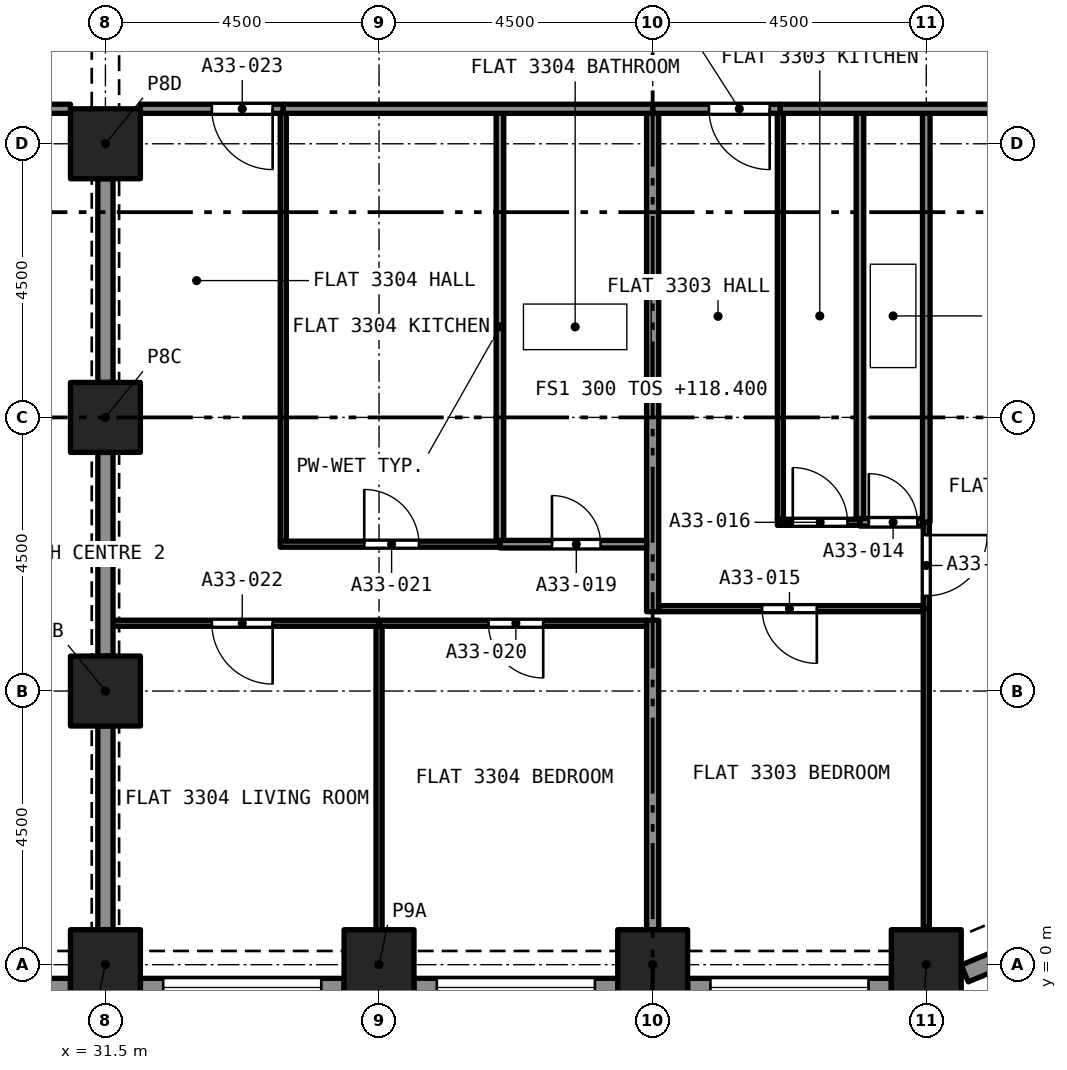
"""IFC4 building model, lengths in metres.
Left out: names, types, materials, properties, quantities, classifications, styles, units other than length and angle.
Written with IfcOpenShell. Run it as: python <this file> out.ifc"""

import sys

from ifc_helpers import new_model, si_unit, direction, frame, frame_2d, origin, origin_2d, place, context, subcontext, project, spatial, rectangle, extrude, element, fill, save


model = new_model("IFC4")
c1 = context("Model", 3, precision=1e-05, world=origin(), true_north=direction((0.0, 1.0)))
c2 = subcontext(c1, "Body", "Model", "MODEL_VIEW")
j1 = project(units=[si_unit("LENGTHUNIT", "METRE"), si_unit("PLANEANGLEUNIT", "RADIAN")], contexts=[c1])
p1 = place(None, origin())
s1 = spatial("IfcSite", under=j1, at=p1, CompositionType="ELEMENT")
p2 = place(p1, origin())
s2 = spatial("IfcBuilding", under=s1, at=p2, CompositionType="ELEMENT")
p3 = place(p2, frame((0.0, 0.0, 118.4)))
s3 = spatial("IfcBuildingStorey", under=s2, at=p3, CompositionType="ELEMENT", Elevation=118.4)
for number, where, z_axis, x_axis in (
    (1, (31.5, 0.0, 0.0), (0.0, 0.0, 1.0), (1.0, 0.0, 0.0)),
    (2, (36.0, 0.0, 0.0), (0.0, 0.0, 1.0), (1.0, 0.0, 0.0)),
    (3, (40.5, 0.0, 0.0), (0.0, 0.0, 1.0), (1.0, 0.0, 0.0)),
    (4, (45.0, 0.0, 0.0), (0.0, 0.0, 1.0), (1.0, 0.0, 0.0)),
    (5, (31.5, 4.5, 0.0), (0.0, 0.0, 1.0), (1.0, 0.0, 0.0)),
    (6, (31.5, 9.0, 0.0), (0.0, 0.0, 1.0), (1.0, 0.0, 0.0)),
    (7, (31.5, 13.5, 0.0), (0.0, 0.0, 1.0), (1.0, 0.0, 0.0)),
):
    element("IfcColumn", number, at=place(p3, frame(where, z_axis=z_axis, x_axis=x_axis)), inside=s3, PredefinedType="COLUMN", context=c2, shape_type="SweptSolid", body=[
        extrude(rectangle(XDim=1.15, YDim=1.15, at=origin_2d()), origin(), (0.0, 0.0, 1.0), 3.2),
    ])
p4 = place(p3, frame((30.925, -0.375, 0.0), z_axis=(0.0, 0.0, 1.0), x_axis=(-1.0, 0.0, 0.0)))
e8 = element("IfcWall", 8, at=p4, inside=s3, PredefinedType="SOLIDWALL", context=c2, shape_type="SweptSolid", body=[
    extrude(rectangle(XDim=3.35, YDim=0.3, at=frame_2d((1.675, 0.0))), origin(), (0.0, 0.0, 1.0), 3.2),
])
p5 = place(p4, frame((0.375, 0.0, 0.45)))
e9 = element("IfcOpeningElement", 9, at=p5, cuts=e8, PredefinedType="OPENING", context=c2, shape_type="SweptSolid", body=[
    extrude(rectangle(XDim=2.6, YDim=1.95, at=frame_2d((1.3, 0.975))), frame((0.0, 0.16, 0.0), z_axis=(0.0, -1.0, 0.0), x_axis=(1.0, 0.0, 0.0)), (0.0, 0.0, 1.0), 0.32),
])
p6 = place(p3, frame((35.425, -0.375, 0.0), z_axis=(0.0, 0.0, 1.0), x_axis=(-1.0, 0.0, 0.0)))
e10 = element("IfcWall", 10, at=p6, inside=s3, PredefinedType="SOLIDWALL", context=c2, shape_type="SweptSolid", body=[
    extrude(rectangle(XDim=3.35, YDim=0.3, at=frame_2d((1.675, 0.0))), origin(), (0.0, 0.0, 1.0), 3.2),
])
p7 = place(p6, frame((0.375, 0.0, 0.45)))
e11 = element("IfcOpeningElement", 11, at=p7, cuts=e10, PredefinedType="OPENING", context=c2, shape_type="SweptSolid", body=[
    extrude(rectangle(XDim=2.6, YDim=1.95, at=frame_2d((1.3, 0.975))), frame((0.0, 0.16, 0.0), z_axis=(0.0, -1.0, 0.0), x_axis=(1.0, 0.0, 0.0)), (0.0, 0.0, 1.0), 0.32),
])
p8 = place(p3, frame((39.925, -0.375, 0.0), z_axis=(0.0, 0.0, 1.0), x_axis=(-1.0, 0.0, 0.0)))
e12 = element("IfcWall", 12, at=p8, inside=s3, PredefinedType="SOLIDWALL", context=c2, shape_type="SweptSolid", body=[
    extrude(rectangle(XDim=3.35, YDim=0.3, at=frame_2d((1.675, 0.0))), origin(), (0.0, 0.0, 1.0), 3.2),
])
p9 = place(p8, frame((0.375, 0.0, 0.45)))
e13 = element("IfcOpeningElement", 13, at=p9, cuts=e12, PredefinedType="OPENING", context=c2, shape_type="SweptSolid", body=[
    extrude(rectangle(XDim=2.6, YDim=1.95, at=frame_2d((1.3, 0.975))), frame((0.0, 0.16, 0.0), z_axis=(0.0, -1.0, 0.0), x_axis=(1.0, 0.0, 0.0)), (0.0, 0.0, 1.0), 0.32),
])
p10 = place(p3, frame((44.425, -0.375, 0.0), z_axis=(0.0, 0.0, 1.0), x_axis=(-1.0, 0.0, 0.0)))
e14 = element("IfcWall", 14, at=p10, inside=s3, PredefinedType="SOLIDWALL", context=c2, shape_type="SweptSolid", body=[
    extrude(rectangle(XDim=3.35, YDim=0.3, at=frame_2d((1.675, 0.0))), origin(), (0.0, 0.0, 1.0), 3.2),
])
p11 = place(p10, frame((0.375, 0.0, 0.45)))
e15 = element("IfcOpeningElement", 15, at=p11, cuts=e14, PredefinedType="OPENING", context=c2, shape_type="SweptSolid", body=[
    extrude(rectangle(XDim=2.6, YDim=1.95, at=frame_2d((1.3, 0.975))), frame((0.0, 0.16, 0.0), z_axis=(0.0, -1.0, 0.0), x_axis=(1.0, 0.0, 0.0)), (0.0, 0.0, 1.0), 0.32),
])
p12 = place(p3, frame((47.631, 0.684, 0.0), z_axis=(0.0, 0.0, 1.0), x_axis=(-0.923862802911, -0.382723818695, 0.0)))
e16 = element("IfcWall", 16, at=p12, inside=s3, PredefinedType="SOLIDWALL", context=c2, shape_type="SweptSolid", body=[
    extrude(rectangle(XDim=2.164, YDim=0.3, at=frame_2d((1.082, 0.0))), origin(), (0.0, 0.0, 1.0), 3.2),
])
p13 = place(p12, frame((0.271, 0.0, 0.45)))
e17 = element("IfcOpeningElement", 17, at=p13, cuts=e16, PredefinedType="OPENING", context=c2, shape_type="SweptSolid", body=[
    extrude(rectangle(XDim=1.4, YDim=1.95, at=frame_2d((0.7, 0.975))), frame((0.0, 0.16, 0.0), z_axis=(0.0, -1.0, 0.0), x_axis=(1.0, 0.0, 0.0)), (0.0, 0.0, 1.0), 0.32),
])
p14 = place(p3, frame((43.909, 7.275, 0.0), z_axis=(0.0, 0.0, 1.0), x_axis=(1.0, 0.0, 0.0)))
e18 = element("IfcWall", 18, at=p14, inside=s3, PredefinedType="PARTITIONING", context=c2, shape_type="SweptSolid", body=[
    extrude(rectangle(XDim=1.028, YDim=0.125, at=frame_2d((0.514, 0.0))), origin(), (0.0, 0.0, 1.0), 2.9),
])
p15 = place(p14, frame((0.146, 0.0, 0.0)))
e19 = element("IfcOpeningElement", 19, at=p15, cuts=e18, PredefinedType="OPENING", context=c2, shape_type="SweptSolid", body=[
    extrude(rectangle(XDim=0.8, YDim=2.1, at=frame_2d((0.4, 1.05))), frame((0.0, 0.073, 0.0), z_axis=(0.0, -1.0, 0.0), x_axis=(1.0, 0.0, 0.0)), (0.0, 0.0, 1.0), 0.145),
])
p16 = place(p3, frame((43.909, 7.337, 0.0), z_axis=(0.0, 0.0, 1.0), x_axis=(0.0, 1.0, 0.0)))
e20 = element("IfcWall", 20, at=p16, inside=s3, PredefinedType="PARTITIONING", context=c2, shape_type="SweptSolid", body=[
    extrude(rectangle(XDim=6.663, YDim=0.125, at=frame_2d((3.331, 0.0))), origin(), (0.0, 0.0, 1.0), 2.9),
])
p17 = place(p3, frame((45.0, 7.275, 0.0), z_axis=(0.0, 0.0, 1.0), x_axis=(0.0, 1.0, 0.0)))
e21 = element("IfcWall", 21, at=p17, inside=s3, PredefinedType="PARTITIONING", context=c2, shape_type="SweptSolid", body=[
    extrude(rectangle(XDim=6.725, YDim=0.125, at=frame_2d((3.363, 0.0))), origin(), (0.0, 0.0, 1.0), 2.9),
])
p18 = place(p3, frame((44.95, 5.855, 0.0), z_axis=(0.0, 0.0, 1.0), x_axis=(-1.0, 0.0, 0.0)))
e22 = element("IfcWall", 22, at=p18, inside=s3, PredefinedType="PARTITIONING", context=c2, shape_type="SweptSolid", body=[
    extrude(rectangle(XDim=4.35, YDim=0.1, at=frame_2d((2.175, 0.0))), origin(), (0.0, 0.0, 1.0), 2.9),
])
p19 = place(p18, frame((1.75, 0.0, 0.0)))
e23 = element("IfcOpeningElement", 23, at=p19, cuts=e22, PredefinedType="OPENING", context=c2, shape_type="SweptSolid", body=[
    extrude(rectangle(XDim=0.9, YDim=2.1, at=frame_2d((0.45, 1.05))), frame((0.0, 0.06, 0.0), z_axis=(0.0, -1.0, 0.0), x_axis=(1.0, 0.0, 0.0)), (0.0, 0.0, 1.0), 0.12),
])
p20 = place(p3, frame((45.0, 0.622, 0.0), z_axis=(0.0, 0.0, 1.0), x_axis=(0.0, 1.0, 0.0)))
e24 = element("IfcWall", 24, at=p20, inside=s3, PredefinedType="PARTITIONING", context=c2, shape_type="SweptSolid", body=[
    extrude(rectangle(XDim=5.233, YDim=0.1, at=frame_2d((2.616, 0.0))), origin(), (0.0, 0.0, 1.0), 2.9),
])
p21 = place(p3, frame((40.5, 0.575, 0.0), z_axis=(0.0, 0.0, 1.0), x_axis=(0.0, 1.0, 0.0)))
e25 = element("IfcWall", 25, at=p21, inside=s3, PredefinedType="PARTITIONING", context=c2, shape_type="SweptSolid", body=[
    extrude(rectangle(XDim=5.09, YDim=0.2, at=frame_2d((2.545, 0.0))), origin(), (0.0, 0.0, 1.0), 2.9),
])
p22 = place(p3, frame((42.6, 7.325, 0.0), z_axis=(0.0, 0.0, 1.0), x_axis=(0.0, 1.0, 0.0)))
e26 = element("IfcWall", 26, at=p22, inside=s3, PredefinedType="PARTITIONING", context=c2, shape_type="SweptSolid", body=[
    extrude(rectangle(XDim=6.675, YDim=0.1, at=frame_2d((3.337, 0.0))), origin(), (0.0, 0.0, 1.0), 2.9),
])
p23 = place(p3, frame((42.55, 7.275, 0.0), z_axis=(0.0, 0.0, 1.0), x_axis=(1.0, 0.0, 0.0)))
e27 = element("IfcWall", 27, at=p23, inside=s3, PredefinedType="PARTITIONING", context=c2, shape_type="SweptSolid", body=[
    extrude(rectangle(XDim=1.359, YDim=0.1, at=frame_2d((0.68, 0.0))), origin(), (0.0, 0.0, 1.0), 2.9),
])
p24 = place(p23, frame((0.254, 0.0, 0.0)))
e28 = element("IfcOpeningElement", 28, at=p24, cuts=e27, PredefinedType="OPENING", context=c2, shape_type="SweptSolid", body=[
    extrude(rectangle(XDim=0.9, YDim=2.1, at=frame_2d((0.45, 1.05))), frame((0.0, 0.06, 0.0), z_axis=(0.0, -1.0, 0.0), x_axis=(1.0, 0.0, 0.0)), (0.0, 0.0, 1.0), 0.12),
])
p25 = place(p3, frame((45.0, 7.275, 0.0), z_axis=(0.0, 0.0, 1.0), x_axis=(0.0, -1.0, 0.0)))
e29 = element("IfcWall", 29, at=p25, inside=s3, PredefinedType="PARTITIONING", context=c2, shape_type="SweptSolid", body=[
    extrude(rectangle(XDim=1.42, YDim=0.1, at=frame_2d((0.71, 0.0))), origin(), (0.0, 0.0, 1.0), 2.9),
])
p26 = place(p25, frame((0.21, 0.0, 0.0)))
e30 = element("IfcOpeningElement", 30, at=p26, cuts=e29, PredefinedType="OPENING", context=c2, shape_type="SweptSolid", body=[
    extrude(rectangle(XDim=1.0, YDim=2.1, at=frame_2d((0.5, 1.05))), frame((0.0, 0.06, 0.0), z_axis=(0.0, -1.0, 0.0), x_axis=(1.0, 0.0, 0.0)), (0.0, 0.0, 1.0), 0.12),
])
p27 = place(p3, frame((40.5, 5.805, 0.0), z_axis=(0.0, 0.0, 1.0), x_axis=(0.0, 1.0, 0.0)))
e31 = element("IfcWall", 31, at=p27, inside=s3, PredefinedType="PARTITIONING", context=c2, shape_type="SweptSolid", body=[
    extrude(rectangle(XDim=8.195, YDim=0.2, at=frame_2d((4.098, 0.0))), origin(), (0.0, 0.0, 1.0), 2.9),
])
p28 = place(p3, frame((42.6, 14.075, 0.0), z_axis=(0.0, 0.0, 1.0), x_axis=(-1.0, 0.0, 0.0)))
e32 = element("IfcWall", 32, at=p28, inside=s3, PredefinedType="PARTITIONING", context=c2, shape_type="SweptSolid", body=[
    extrude(rectangle(XDim=2.1, YDim=0.15, at=frame_2d((1.05, 0.0))), origin(), (0.0, 0.0, 1.0), 2.9),
])
p29 = place(p28, frame((0.175, 0.0, 0.0)))
e33 = element("IfcOpeningElement", 33, at=p29, cuts=e32, PredefinedType="OPENING", context=c2, shape_type="SweptSolid", body=[
    extrude(rectangle(XDim=1.0, YDim=2.1, at=frame_2d((0.5, 1.05))), frame((0.0, 0.085, 0.0), z_axis=(0.0, -1.0, 0.0), x_axis=(1.0, 0.0, 0.0)), (0.0, 0.0, 1.0), 0.17),
])
p30 = place(p3, frame((42.6, 14.075, 0.0), z_axis=(0.0, 0.0, 1.0), x_axis=(1.0, 0.0, 0.0)))
e34 = element("IfcWall", 34, at=p30, inside=s3, PredefinedType="PARTITIONING", context=c2, shape_type="SweptSolid", body=[
    extrude(rectangle(XDim=6.325, YDim=0.15, at=frame_2d((3.163, 0.0))), origin(), (0.0, 0.0, 1.0), 2.9),
])
p31 = place(p3, frame((37.988, 6.915, 0.0), z_axis=(0.0, 0.0, 1.0), x_axis=(1.0, 0.0, 0.0)))
e35 = element("IfcWall", 35, at=p31, inside=s3, PredefinedType="PARTITIONING", context=c2, shape_type="SweptSolid", body=[
    extrude(rectangle(XDim=2.412, YDim=0.125, at=frame_2d((1.206, 0.0))), origin(), (0.0, 0.0, 1.0), 2.9),
])
p32 = place(p31, frame((0.856, 0.0, 0.0)))
e36 = element("IfcOpeningElement", 36, at=p32, cuts=e35, PredefinedType="OPENING", context=c2, shape_type="SweptSolid", body=[
    extrude(rectangle(XDim=0.8, YDim=2.1, at=frame_2d((0.4, 1.05))), frame((0.0, 0.073, 0.0), z_axis=(0.0, -1.0, 0.0), x_axis=(1.0, 0.0, 0.0)), (0.0, 0.0, 1.0), 0.145),
])
p33 = place(p3, frame((37.988, 6.978, 0.0), z_axis=(0.0, 0.0, 1.0), x_axis=(0.0, 1.0, 0.0)))
e37 = element("IfcWall", 37, at=p33, inside=s3, PredefinedType="PARTITIONING", context=c2, shape_type="SweptSolid", body=[
    extrude(rectangle(XDim=7.022, YDim=0.125, at=frame_2d((3.511, 0.0))), origin(), (0.0, 0.0, 1.0), 2.9),
])
p34 = place(p3, frame((40.4, 5.615, 0.0), z_axis=(0.0, 0.0, 1.0), x_axis=(-1.0, 0.0, 0.0)))
e38 = element("IfcWall", 38, at=p34, inside=s3, PredefinedType="PARTITIONING", context=c2, shape_type="SweptSolid", body=[
    extrude(rectangle(XDim=4.4, YDim=0.1, at=frame_2d((2.2, 0.0))), origin(), (0.0, 0.0, 1.0), 2.9),
])
p35 = place(p34, frame((1.7, 0.0, 0.0)))
e39 = element("IfcOpeningElement", 39, at=p35, cuts=e38, PredefinedType="OPENING", context=c2, shape_type="SweptSolid", body=[
    extrude(rectangle(XDim=0.9, YDim=2.1, at=frame_2d((0.45, 1.05))), frame((0.0, 0.06, 0.0), z_axis=(0.0, -1.0, 0.0), x_axis=(1.0, 0.0, 0.0)), (0.0, 0.0, 1.0), 0.12),
])
p36 = place(p3, frame((36.0, 0.575, 0.0), z_axis=(0.0, 0.0, 1.0), x_axis=(0.0, 1.0, 0.0)))
e40 = element("IfcWall", 40, at=p36, inside=s3, PredefinedType="PARTITIONING", context=c2, shape_type="SweptSolid", body=[
    extrude(rectangle(XDim=4.99, YDim=0.1, at=frame_2d((2.495, 0.0))), origin(), (0.0, 0.0, 1.0), 2.9),
])
p37 = place(p3, frame((34.425, 6.965, 0.0), z_axis=(0.0, 0.0, 1.0), x_axis=(0.0, 1.0, 0.0)))
e41 = element("IfcWall", 41, at=p37, inside=s3, PredefinedType="PARTITIONING", context=c2, shape_type="SweptSolid", body=[
    extrude(rectangle(XDim=7.035, YDim=0.1, at=frame_2d((3.518, 0.0))), origin(), (0.0, 0.0, 1.0), 2.9),
])
p38 = place(p3, frame((34.375, 6.915, 0.0), z_axis=(0.0, 0.0, 1.0), x_axis=(1.0, 0.0, 0.0)))
e42 = element("IfcWall", 42, at=p38, inside=s3, PredefinedType="PARTITIONING", context=c2, shape_type="SweptSolid", body=[
    extrude(rectangle(XDim=3.613, YDim=0.1, at=frame_2d((1.807, 0.0))), origin(), (0.0, 0.0, 1.0), 2.9),
])
p39 = place(p38, frame((1.382, 0.0, 0.0)))
e43 = element("IfcOpeningElement", 43, at=p39, cuts=e42, PredefinedType="OPENING", context=c2, shape_type="SweptSolid", body=[
    extrude(rectangle(XDim=0.9, YDim=2.1, at=frame_2d((0.45, 1.05))), frame((0.0, 0.06, 0.0), z_axis=(0.0, -1.0, 0.0), x_axis=(1.0, 0.0, 0.0)), (0.0, 0.0, 1.0), 0.12),
])
p40 = place(p3, frame((36.0, 5.615, 0.0), z_axis=(0.0, 0.0, 1.0), x_axis=(-1.0, 0.0, 0.0)))
e44 = element("IfcWall", 44, at=p40, inside=s3, PredefinedType="PARTITIONING", context=c2, shape_type="SweptSolid", body=[
    extrude(rectangle(XDim=4.375, YDim=0.1, at=frame_2d((2.188, 0.0))), origin(), (0.0, 0.0, 1.0), 2.9),
])
p41 = place(p40, frame((1.75, 0.0, 0.0)))
e45 = element("IfcOpeningElement", 45, at=p41, cuts=e44, PredefinedType="OPENING", context=c2, shape_type="SweptSolid", body=[
    extrude(rectangle(XDim=1.0, YDim=2.1, at=frame_2d((0.5, 1.05))), frame((0.0, 0.06, 0.0), z_axis=(0.0, -1.0, 0.0), x_axis=(1.0, 0.0, 0.0)), (0.0, 0.0, 1.0), 0.12),
])
p42 = place(p3, frame((31.5, 9.575, 0.0), z_axis=(0.0, 0.0, 1.0), x_axis=(0.0, 1.0, 0.0)))
e46 = element("IfcWall", 46, at=p42, inside=s3, PredefinedType="PARTITIONING", context=c2, shape_type="SweptSolid", body=[
    extrude(rectangle(XDim=3.35, YDim=0.25, at=frame_2d((1.675, 0.0))), origin(), (0.0, 0.0, 1.0), 2.38),
])
p43 = place(p3, frame((34.425, 14.075, 0.0), z_axis=(0.0, 0.0, 1.0), x_axis=(-1.0, 0.0, 0.0)))
e47 = element("IfcWall", 47, at=p43, inside=s3, PredefinedType="PARTITIONING", context=c2, shape_type="SweptSolid", body=[
    extrude(rectangle(XDim=2.35, YDim=0.15, at=frame_2d((1.175, 0.0))), origin(), (0.0, 0.0, 1.0), 2.9),
])
p44 = place(p43, frame((0.175, 0.0, 0.0)))
e48 = element("IfcOpeningElement", 48, at=p44, cuts=e47, PredefinedType="OPENING", context=c2, shape_type="SweptSolid", body=[
    extrude(rectangle(XDim=1.0, YDim=2.1, at=frame_2d((0.5, 1.05))), frame((0.0, 0.085, 0.0), z_axis=(0.0, -1.0, 0.0), x_axis=(1.0, 0.0, 0.0)), (0.0, 0.0, 1.0), 0.17),
])
p45 = place(p3, frame((34.425, 14.075, 0.0), z_axis=(0.0, 0.0, 1.0), x_axis=(1.0, 0.0, 0.0)))
e49 = element("IfcWall", 49, at=p45, inside=s3, PredefinedType="PARTITIONING", context=c2, shape_type="SweptSolid", body=[
    extrude(rectangle(XDim=6.075, YDim=0.15, at=frame_2d((3.038, 0.0))), origin(), (0.0, 0.0, 1.0), 2.9),
])
for number, where, z_axis, x_axis in (
    (50, (31.5, 0.575, 0.0), (0.0, 0.0, 1.0), (0.0, 1.0, 0.0)),
    (51, (31.5, 5.075, 0.0), (0.0, 0.0, 1.0), (0.0, 1.0, 0.0)),
):
    element("IfcWall", number, at=place(p3, frame(where, z_axis=z_axis, x_axis=x_axis)), inside=s3, PredefinedType="PARTITIONING", context=c2, shape_type="SweptSolid", body=[
        extrude(rectangle(XDim=3.35, YDim=0.25, at=frame_2d((1.675, 0.0))), origin(), (0.0, 0.0, 1.0), 2.38),
    ])
p46 = place(p3, frame((30.925, 14.075, 0.0), z_axis=(0.0, 0.0, 1.0), x_axis=(-1.0, 0.0, 0.0)))
e52 = element("IfcWall", 52, at=p46, inside=s3, PredefinedType="PARTITIONING", context=c2, shape_type="SweptSolid", body=[
    extrude(rectangle(XDim=3.925, YDim=0.15, at=frame_2d((1.962, 0.0))), origin(), (0.0, 0.0, 1.0), 2.75),
])
p47 = place(p46, frame((1.175, 0.0, 0.0)))
e53 = element("IfcOpeningElement", 53, at=p47, cuts=e52, PredefinedType="OPENING", context=c2, shape_type="SweptSolid", body=[
    extrude(rectangle(XDim=1.0, YDim=2.1, at=frame_2d((0.5, 1.05))), frame((0.0, 0.085, 0.0), z_axis=(0.0, -1.0, 0.0), x_axis=(1.0, 0.0, 0.0)), (0.0, 0.0, 1.0), 0.17),
])
p48 = place(p7, origin())
e54 = element("IfcWindow", 54, at=p48, inside=s3, PartitioningType="SINGLE_PANEL", PredefinedType="WINDOW", context=c2, shape_type="SweptSolid", body=[
    extrude(rectangle(XDim=2.6, YDim=1.95, at=frame_2d((1.3, 0.975))), frame((0.0, 0.03, 0.0), z_axis=(0.0, -1.0, 0.0), x_axis=(1.0, 0.0, 0.0)), (0.0, 0.0, 1.0), 0.06),
])
fill(e11, e54)
p49 = place(p9, origin())
e55 = element("IfcWindow", 55, at=p49, inside=s3, PartitioningType="SINGLE_PANEL", PredefinedType="WINDOW", context=c2, shape_type="SweptSolid", body=[
    extrude(rectangle(XDim=2.6, YDim=1.95, at=frame_2d((1.3, 0.975))), frame((0.0, 0.03, 0.0), z_axis=(0.0, -1.0, 0.0), x_axis=(1.0, 0.0, 0.0)), (0.0, 0.0, 1.0), 0.06),
])
fill(e13, e55)
p50 = place(p11, origin())
e56 = element("IfcWindow", 56, at=p50, inside=s3, PartitioningType="SINGLE_PANEL", PredefinedType="WINDOW", context=c2, shape_type="SweptSolid", body=[
    extrude(rectangle(XDim=2.6, YDim=1.95, at=frame_2d((1.3, 0.975))), frame((0.0, 0.03, 0.0), z_axis=(0.0, -1.0, 0.0), x_axis=(1.0, 0.0, 0.0)), (0.0, 0.0, 1.0), 0.06),
])
fill(e15, e56)
p51 = place(p15, origin())
e57 = element("IfcDoor", 57, at=p51, inside=s3, OperationType="SINGLE_SWING_RIGHT", PredefinedType="DOOR", context=c2, shape_type="SweptSolid", body=[
    extrude(rectangle(XDim=0.8, YDim=2.1, at=frame_2d((0.4, 1.05))), frame((0.0, 0.025, 0.0), z_axis=(0.0, -1.0, 0.0), x_axis=(1.0, 0.0, 0.0)), (0.0, 0.0, 1.0), 0.05),
])
fill(e19, e57)
p52 = place(p19, origin())
e58 = element("IfcDoor", 58, at=p52, inside=s3, OperationType="SINGLE_SWING_RIGHT", PredefinedType="DOOR", context=c2, shape_type="SweptSolid", body=[
    extrude(rectangle(XDim=0.9, YDim=2.1, at=frame_2d((0.45, 1.05))), frame((0.0, 0.025, 0.0), z_axis=(0.0, -1.0, 0.0), x_axis=(1.0, 0.0, 0.0)), (0.0, 0.0, 1.0), 0.05),
])
fill(e23, e58)
p53 = place(p24, origin())
e59 = element("IfcDoor", 59, at=p53, inside=s3, OperationType="SINGLE_SWING_RIGHT", PredefinedType="DOOR", context=c2, shape_type="SweptSolid", body=[
    extrude(rectangle(XDim=0.9, YDim=2.1, at=frame_2d((0.45, 1.05))), frame((0.0, 0.025, 0.0), z_axis=(0.0, -1.0, 0.0), x_axis=(1.0, 0.0, 0.0)), (0.0, 0.0, 1.0), 0.05),
])
fill(e28, e59)
p54 = place(p26, origin())
e60 = element("IfcDoor", 60, at=p54, inside=s3, OperationType="SINGLE_SWING_RIGHT", PredefinedType="DOOR", context=c2, shape_type="SweptSolid", body=[
    extrude(rectangle(XDim=1.0, YDim=2.1, at=frame_2d((0.5, 1.05))), frame((0.0, 0.025, 0.0), z_axis=(0.0, -1.0, 0.0), x_axis=(1.0, 0.0, 0.0)), (0.0, 0.0, 1.0), 0.05),
])
fill(e30, e60)
p55 = place(p29, origin())
e61 = element("IfcDoor", 61, at=p55, inside=s3, OperationType="SINGLE_SWING_LEFT", PredefinedType="DOOR", context=c2, shape_type="SweptSolid", body=[
    extrude(rectangle(XDim=1.0, YDim=2.1, at=frame_2d((0.5, 1.05))), frame((0.0, 0.025, 0.0), z_axis=(0.0, -1.0, 0.0), x_axis=(1.0, 0.0, 0.0)), (0.0, 0.0, 1.0), 0.05),
])
fill(e33, e61)
p56 = place(p32, origin())
e62 = element("IfcDoor", 62, at=p56, inside=s3, OperationType="SINGLE_SWING_RIGHT", PredefinedType="DOOR", context=c2, shape_type="SweptSolid", body=[
    extrude(rectangle(XDim=0.8, YDim=2.1, at=frame_2d((0.4, 1.05))), frame((0.0, 0.025, 0.0), z_axis=(0.0, -1.0, 0.0), x_axis=(1.0, 0.0, 0.0)), (0.0, 0.0, 1.0), 0.05),
])
fill(e36, e62)
p57 = place(p35, origin())
e63 = element("IfcDoor", 63, at=p57, inside=s3, OperationType="SINGLE_SWING_LEFT", PredefinedType="DOOR", context=c2, shape_type="SweptSolid", body=[
    extrude(rectangle(XDim=0.9, YDim=2.1, at=frame_2d((0.45, 1.05))), frame((0.0, 0.025, 0.0), z_axis=(0.0, -1.0, 0.0), x_axis=(1.0, 0.0, 0.0)), (0.0, 0.0, 1.0), 0.05),
])
fill(e39, e63)
p58 = place(p39, origin())
e64 = element("IfcDoor", 64, at=p58, inside=s3, OperationType="SINGLE_SWING_RIGHT", PredefinedType="DOOR", context=c2, shape_type="SweptSolid", body=[
    extrude(rectangle(XDim=0.9, YDim=2.1, at=frame_2d((0.45, 1.05))), frame((0.0, 0.025, 0.0), z_axis=(0.0, -1.0, 0.0), x_axis=(1.0, 0.0, 0.0)), (0.0, 0.0, 1.0), 0.05),
])
fill(e43, e64)
p59 = place(p41, origin())
e65 = element("IfcDoor", 65, at=p59, inside=s3, OperationType="SINGLE_SWING_RIGHT", PredefinedType="DOOR", context=c2, shape_type="SweptSolid", body=[
    extrude(rectangle(XDim=1.0, YDim=2.1, at=frame_2d((0.5, 1.05))), frame((0.0, 0.025, 0.0), z_axis=(0.0, -1.0, 0.0), x_axis=(1.0, 0.0, 0.0)), (0.0, 0.0, 1.0), 0.05),
])
fill(e45, e65)
p60 = place(p44, origin())
e66 = element("IfcDoor", 66, at=p60, inside=s3, OperationType="SINGLE_SWING_LEFT", PredefinedType="DOOR", context=c2, shape_type="SweptSolid", body=[
    extrude(rectangle(XDim=1.0, YDim=2.1, at=frame_2d((0.5, 1.05))), frame((0.0, 0.025, 0.0), z_axis=(0.0, -1.0, 0.0), x_axis=(1.0, 0.0, 0.0)), (0.0, 0.0, 1.0), 0.05),
])
fill(e48, e66)
save(model, sys.argv[1])
